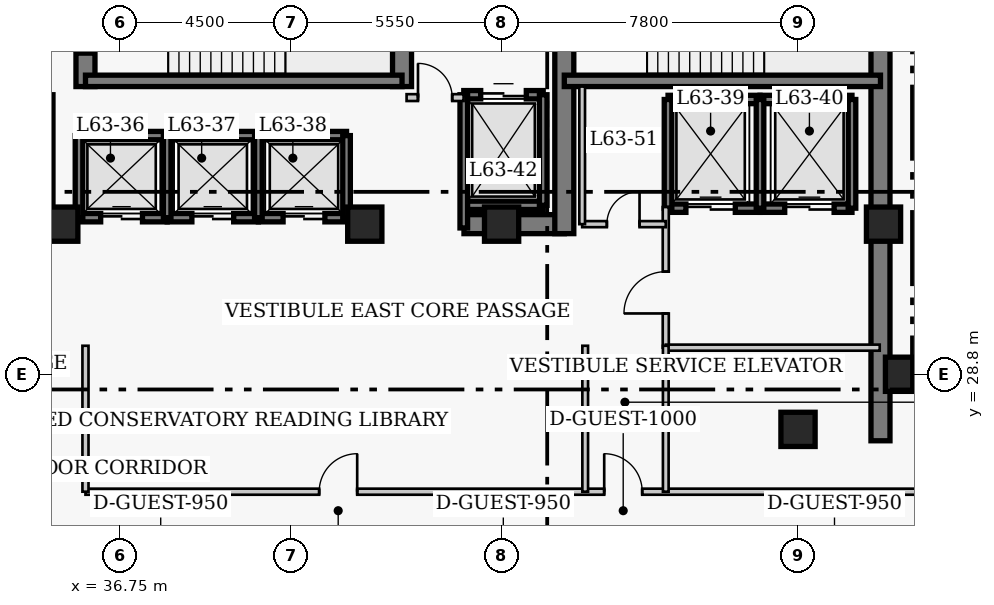
"""IFC4 building model, lengths in metres.
Left out: names, types, materials, properties, quantities, classifications, styles, units other than length and angle.
Written with IfcOpenShell. Run it as: python <this file> out.ifc"""

import sys

from ifc_helpers import new_model, si_unit, direction, frame, frame_2d, origin, origin_2d, place, context, subcontext, project, spatial, rectangle, extrude, element, fill, save


model = new_model("IFC4")
c1 = context("Model", 3, precision=1e-05, world=origin(), true_north=direction((0.0, 1.0)))
c2 = subcontext(c1, "Body", "Model", "MODEL_VIEW")
j1 = project(units=[si_unit("LENGTHUNIT", "METRE"), si_unit("PLANEANGLEUNIT", "RADIAN")], contexts=[c1])
p1 = place(None, origin())
s1 = spatial("IfcSite", under=j1, at=p1, CompositionType="ELEMENT")
p2 = place(p1, origin())
s2 = spatial("IfcBuilding", under=s1, at=p2, CompositionType="ELEMENT")
p3 = place(p2, frame((0.0, 0.0, 253.4)))
s3 = spatial("IfcBuildingStorey", under=s2, at=p3, CompositionType="ELEMENT", Elevation=253.4)
p4 = place(p3, frame((56.77, 27.05, 0.0), z_axis=(0.0, 0.0, 1.0), x_axis=(0.0, 1.0, 0.0)))
e1 = element("IfcWall", 1, at=p4, inside=s3, PredefinedType="SHEAR", context=c2, shape_type="SweptSolid", body=[
    extrude(rectangle(XDim=13.52, YDim=0.5, at=frame_2d((6.76, 0.0))), origin(), (0.0, 0.0, 1.0), 4.0),
])
p5 = place(p3, frame((45.81, 32.75, 0.0), z_axis=(0.0, 0.0, 1.0), x_axis=(1.0, 0.0, 0.0)))
e2 = element("IfcWall", 2, at=p5, inside=s3, PredefinedType="SHEAR", context=c2, shape_type="SweptSolid", body=[
    extrude(rectangle(XDim=2.64, YDim=0.5, at=frame_2d((1.32, 0.0))), origin(), (0.0, 0.0, 1.0), 4.0),
])
p6 = place(p3, frame((35.85, 36.37, 0.0), z_axis=(0.0, 0.0, 1.0), x_axis=(0.0, 1.0, 0.0)))
e3 = element("IfcWall", 3, at=p6, inside=s3, PredefinedType="SHEAR", context=c2, shape_type="SweptSolid", body=[
    extrude(rectangle(XDim=3.95, YDim=0.5, at=frame_2d((1.975, 0.0))), origin(), (0.0, 0.0, 1.0), 4.0),
])
p7 = place(p6, frame((0.88, 0.0, 0.0)))
e4 = element("IfcOpeningElement", 4, at=p7, cuts=e3, PredefinedType="OPENING", context=c2, shape_type="SweptSolid", body=[
    extrude(rectangle(XDim=1.1, YDim=2.15, at=frame_2d((0.55, 1.075))), frame((0.0, 0.26, 0.0), z_axis=(0.0, -1.0, 0.0), x_axis=(1.0, 0.0, 0.0)), (0.0, 0.0, 1.0), 0.52),
])
p8 = place(p3, frame((44.18, 36.37, 0.0), z_axis=(0.0, 0.0, 1.0), x_axis=(0.0, 1.0, 0.0)))
e5 = element("IfcWall", 5, at=p8, inside=s3, PredefinedType="SHEAR", context=c2, shape_type="SweptSolid", body=[
    extrude(rectangle(XDim=3.95, YDim=0.5, at=frame_2d((1.975, 0.0))), origin(), (0.0, 0.0, 1.0), 4.0),
])
p9 = place(p3, frame((48.45, 32.5, 0.0), z_axis=(0.0, 0.0, 1.0), x_axis=(0.0, 1.0, 0.0)))
e6 = element("IfcWall", 6, at=p9, inside=s3, PredefinedType="SHEAR", context=c2, shape_type="SweptSolid", body=[
    extrude(rectangle(XDim=7.82, YDim=0.5, at=frame_2d((3.91, 0.0))), origin(), (0.0, 0.0, 1.0), 4.0),
])
p10 = place(p9, frame((5.7, 0.0, 0.0)))
e7 = element("IfcOpeningElement", 7, at=p10, cuts=e6, PredefinedType="OPENING", context=c2, shape_type="SweptSolid", body=[
    extrude(rectangle(XDim=1.1, YDim=2.15, at=frame_2d((0.55, 1.075))), frame((0.0, 0.26, 0.0), z_axis=(0.0, -1.0, 0.0), x_axis=(1.0, 0.0, 0.0)), (0.0, 0.0, 1.0), 0.52),
])
p11 = place(p3, frame((35.85, 36.52, 0.0), z_axis=(0.0, 0.0, 1.0), x_axis=(1.0, 0.0, 0.0)))
e8 = element("IfcWall", 8, at=p11, inside=s3, PredefinedType="SHEAR", context=c2, shape_type="SweptSolid", body=[
    extrude(rectangle(XDim=8.33, YDim=0.3, at=frame_2d((4.165, 0.0))), origin(), (0.0, 0.0, 1.0), 4.0),
])
p12 = place(p3, frame((48.45, 36.52, 0.0), z_axis=(0.0, 0.0, 1.0), x_axis=(1.0, 0.0, 0.0)))
e9 = element("IfcWall", 9, at=p12, inside=s3, PredefinedType="SHEAR", context=c2, shape_type="SweptSolid", body=[
    extrude(rectangle(XDim=8.32, YDim=0.3, at=frame_2d((4.16, 0.0))), origin(), (0.0, 0.0, 1.0), 4.0),
])
for number, where, z_axis, x_axis in (
    (10, (57.35, 28.8, 0.0), (0.0, 0.0, 1.0), (1.0, 0.0, 0.0)),
    (11, (35.2, 32.75, 0.0), (0.0, 0.0, 1.0), (1.0, 0.0, 0.0)),
    (12, (43.2, 32.75, 0.0), (0.0, 0.0, 1.0), (1.0, 0.0, 0.0)),
    (13, (46.8, 32.75, 0.0), (0.0, 0.0, 1.0), (1.0, 0.0, 0.0)),
    (14, (54.6, 27.35, 0.0), (0.0, 0.0, 1.0), (1.0, 0.0, 0.0)),
    (15, (56.85, 32.75, 0.0), (0.0, 0.0, 1.0), (1.0, 0.0, 0.0)),
):
    element("IfcColumn", number, at=place(p3, frame(where, z_axis=z_axis, x_axis=x_axis)), inside=s3, PredefinedType="COLUMN", context=c2, shape_type="SweptSolid", body=[
        extrude(rectangle(XDim=0.9, YDim=0.9, at=origin_2d()), origin(), (0.0, 0.0, 1.0), 4.0),
    ])
p13 = place(p3, frame((35.68, 35.08, 0.0), z_axis=(0.0, 0.0, 1.0), x_axis=(1.0, 0.0, 0.0)))
e16 = element("IfcWall", 16, at=p13, inside=s3, PredefinedType="SHEAR", context=c2, shape_type="SweptSolid", body=[
    extrude(rectangle(XDim=2.32, YDim=0.22, at=frame_2d((1.16, 0.0))), origin(), (0.0, 0.0, 1.0), 4.0),
])
p14 = place(p3, frame((35.68, 32.92, 0.0), z_axis=(0.0, 0.0, 1.0), x_axis=(1.0, 0.0, 0.0)))
e17 = element("IfcWall", 17, at=p14, inside=s3, PredefinedType="SHEAR", context=c2, shape_type="SweptSolid", body=[
    extrude(rectangle(XDim=2.32, YDim=0.22, at=frame_2d((1.16, 0.0))), origin(), (0.0, 0.0, 1.0), 4.0),
])
p15 = place(p14, frame((0.57, 0.0, 0.0)))
e18 = element("IfcOpeningElement", 18, at=p15, cuts=e17, PredefinedType="OPENING", context=c2, shape_type="SweptSolid", body=[
    extrude(rectangle(XDim=1.1, YDim=2.15, at=frame_2d((0.55, 1.075))), frame((0.0, 0.12, 0.0), z_axis=(0.0, -1.0, 0.0), x_axis=(1.0, 0.0, 0.0)), (0.0, 0.0, 1.0), 0.24),
])
p16 = place(p3, frame((35.68, 32.92, 0.0), z_axis=(0.0, 0.0, 1.0), x_axis=(0.0, 1.0, 0.0)))
e19 = element("IfcWall", 19, at=p16, inside=s3, PredefinedType="SHEAR", context=c2, shape_type="SweptSolid", body=[
    extrude(rectangle(XDim=2.16, YDim=0.2, at=frame_2d((1.08, 0.0))), origin(), (0.0, 0.0, 1.0), 4.0),
])
p17 = place(p3, frame((38.0, 35.08, 0.0), z_axis=(0.0, 0.0, 1.0), x_axis=(1.0, 0.0, 0.0)))
e20 = element("IfcWall", 20, at=p17, inside=s3, PredefinedType="SHEAR", context=c2, shape_type="SweptSolid", body=[
    extrude(rectangle(XDim=2.4, YDim=0.22, at=frame_2d((1.2, 0.0))), origin(), (0.0, 0.0, 1.0), 4.0),
])
p18 = place(p3, frame((38.0, 32.92, 0.0), z_axis=(0.0, 0.0, 1.0), x_axis=(1.0, 0.0, 0.0)))
e21 = element("IfcWall", 21, at=p18, inside=s3, PredefinedType="SHEAR", context=c2, shape_type="SweptSolid", body=[
    extrude(rectangle(XDim=2.4, YDim=0.22, at=frame_2d((1.2, 0.0))), origin(), (0.0, 0.0, 1.0), 4.0),
])
p19 = place(p18, frame((0.65, 0.0, 0.0)))
e22 = element("IfcOpeningElement", 22, at=p19, cuts=e21, PredefinedType="OPENING", context=c2, shape_type="SweptSolid", body=[
    extrude(rectangle(XDim=1.1, YDim=2.15, at=frame_2d((0.55, 1.075))), frame((0.0, 0.12, 0.0), z_axis=(0.0, -1.0, 0.0), x_axis=(1.0, 0.0, 0.0)), (0.0, 0.0, 1.0), 0.24),
])
p20 = place(p3, frame((38.0, 32.92, 0.0), z_axis=(0.0, 0.0, 1.0), x_axis=(0.0, 1.0, 0.0)))
e23 = element("IfcWall", 23, at=p20, inside=s3, PredefinedType="SHEAR", context=c2, shape_type="SweptSolid", body=[
    extrude(rectangle(XDim=2.16, YDim=0.2, at=frame_2d((1.08, 0.0))), origin(), (0.0, 0.0, 1.0), 4.0),
])
p21 = place(p3, frame((40.4, 35.08, 0.0), z_axis=(0.0, 0.0, 1.0), x_axis=(1.0, 0.0, 0.0)))
e24 = element("IfcWall", 24, at=p21, inside=s3, PredefinedType="SHEAR", context=c2, shape_type="SweptSolid", body=[
    extrude(rectangle(XDim=2.32, YDim=0.22, at=frame_2d((1.16, 0.0))), origin(), (0.0, 0.0, 1.0), 4.0),
])
p22 = place(p3, frame((40.4, 32.92, 0.0), z_axis=(0.0, 0.0, 1.0), x_axis=(1.0, 0.0, 0.0)))
e25 = element("IfcWall", 25, at=p22, inside=s3, PredefinedType="SHEAR", context=c2, shape_type="SweptSolid", body=[
    extrude(rectangle(XDim=2.32, YDim=0.22, at=frame_2d((1.16, 0.0))), origin(), (0.0, 0.0, 1.0), 4.0),
])
p23 = place(p22, frame((0.65, 0.0, 0.0)))
e26 = element("IfcOpeningElement", 26, at=p23, cuts=e25, PredefinedType="OPENING", context=c2, shape_type="SweptSolid", body=[
    extrude(rectangle(XDim=1.1, YDim=2.15, at=frame_2d((0.55, 1.075))), frame((0.0, 0.12, 0.0), z_axis=(0.0, -1.0, 0.0), x_axis=(1.0, 0.0, 0.0)), (0.0, 0.0, 1.0), 0.24),
])
for number, where, z_axis, x_axis in (
    (27, (40.4, 32.92, 0.0), (0.0, 0.0, 1.0), (0.0, 1.0, 0.0)),
    (28, (42.72, 32.92, 0.0), (0.0, 0.0, 1.0), (0.0, 1.0, 0.0)),
):
    element("IfcWall", number, at=place(p3, frame(where, z_axis=z_axis, x_axis=x_axis)), inside=s3, PredefinedType="SHEAR", context=c2, shape_type="SweptSolid", body=[
        extrude(rectangle(XDim=2.16, YDim=0.2, at=frame_2d((1.08, 0.0))), origin(), (0.0, 0.0, 1.0), 4.0),
    ])
p24 = place(p3, frame((51.18, 36.03, 0.0), z_axis=(0.0, 0.0, 1.0), x_axis=(1.0, 0.0, 0.0)))
e29 = element("IfcWall", 29, at=p24, inside=s3, PredefinedType="SHEAR", context=c2, shape_type="SweptSolid", body=[
    extrude(rectangle(XDim=2.42, YDim=0.22, at=frame_2d((1.21, 0.0))), origin(), (0.0, 0.0, 1.0), 4.0),
])
p25 = place(p3, frame((51.18, 33.17, 0.0), z_axis=(0.0, 0.0, 1.0), x_axis=(1.0, 0.0, 0.0)))
e30 = element("IfcWall", 30, at=p25, inside=s3, PredefinedType="SHEAR", context=c2, shape_type="SweptSolid", body=[
    extrude(rectangle(XDim=2.42, YDim=0.22, at=frame_2d((1.21, 0.0))), origin(), (0.0, 0.0, 1.0), 4.0),
])
p26 = place(p25, frame((0.47, 0.0, 0.0)))
e31 = element("IfcOpeningElement", 31, at=p26, cuts=e30, PredefinedType="OPENING", context=c2, shape_type="SweptSolid", body=[
    extrude(rectangle(XDim=1.3, YDim=2.15, at=frame_2d((0.65, 1.075))), frame((0.0, 0.12, 0.0), z_axis=(0.0, -1.0, 0.0), x_axis=(1.0, 0.0, 0.0)), (0.0, 0.0, 1.0), 0.24),
])
p27 = place(p3, frame((51.18, 33.17, 0.0), z_axis=(0.0, 0.0, 1.0), x_axis=(0.0, 1.0, 0.0)))
e32 = element("IfcWall", 32, at=p27, inside=s3, PredefinedType="SHEAR", context=c2, shape_type="SweptSolid", body=[
    extrude(rectangle(XDim=2.86, YDim=0.2, at=frame_2d((1.43, 0.0))), origin(), (0.0, 0.0, 1.0), 4.0),
])
p28 = place(p3, frame((53.6, 36.03, 0.0), z_axis=(0.0, 0.0, 1.0), x_axis=(1.0, 0.0, 0.0)))
e33 = element("IfcWall", 33, at=p28, inside=s3, PredefinedType="SHEAR", context=c2, shape_type="SweptSolid", body=[
    extrude(rectangle(XDim=2.42, YDim=0.22, at=frame_2d((1.21, 0.0))), origin(), (0.0, 0.0, 1.0), 4.0),
])
p29 = place(p3, frame((53.6, 33.17, 0.0), z_axis=(0.0, 0.0, 1.0), x_axis=(1.0, 0.0, 0.0)))
e34 = element("IfcWall", 34, at=p29, inside=s3, PredefinedType="SHEAR", context=c2, shape_type="SweptSolid", body=[
    extrude(rectangle(XDim=2.42, YDim=0.22, at=frame_2d((1.21, 0.0))), origin(), (0.0, 0.0, 1.0), 4.0),
])
p30 = place(p29, frame((0.65, 0.0, 0.0)))
e35 = element("IfcOpeningElement", 35, at=p30, cuts=e34, PredefinedType="OPENING", context=c2, shape_type="SweptSolid", body=[
    extrude(rectangle(XDim=1.3, YDim=2.15, at=frame_2d((0.65, 1.075))), frame((0.0, 0.12, 0.0), z_axis=(0.0, -1.0, 0.0), x_axis=(1.0, 0.0, 0.0)), (0.0, 0.0, 1.0), 0.24),
])
for number, where, z_axis, x_axis in (
    (36, (53.6, 33.17, 0.0), (0.0, 0.0, 1.0), (0.0, 1.0, 0.0)),
    (37, (56.02, 33.17, 0.0), (0.0, 0.0, 1.0), (0.0, 1.0, 0.0)),
):
    element("IfcWall", number, at=place(p3, frame(where, z_axis=z_axis, x_axis=x_axis)), inside=s3, PredefinedType="SHEAR", context=c2, shape_type="SweptSolid", body=[
        extrude(rectangle(XDim=2.86, YDim=0.2, at=frame_2d((1.43, 0.0))), origin(), (0.0, 0.0, 1.0), 4.0),
    ])
p31 = place(p3, frame((34.895, 33.245, 0.0), z_axis=(0.0, 0.0, 1.0), x_axis=(0.0, 1.0, 0.0)))
e38 = element("IfcWall", 38, at=p31, inside=s3, PredefinedType="SHEAR", context=c2, shape_type="SweptSolid", body=[
    extrude(rectangle(XDim=2.91, YDim=0.2, at=frame_2d((1.455, 0.0))), origin(), (0.0, 0.0, 1.0), 4.0),
])
p32 = place(p3, frame((45.805, 36.155, 0.0), z_axis=(0.0, 0.0, 1.0), x_axis=(1.0, 0.0, 0.0)))
e39 = element("IfcWall", 39, at=p32, inside=s3, PredefinedType="SHEAR", context=c2, shape_type="SweptSolid", body=[
    extrude(rectangle(XDim=2.09, YDim=0.22, at=frame_2d((1.045, 0.0))), origin(), (0.0, 0.0, 1.0), 4.0),
])
p33 = place(p32, frame((0.445, 0.0, 0.0)))
e40 = element("IfcOpeningElement", 40, at=p33, cuts=e39, PredefinedType="OPENING", context=c2, shape_type="SweptSolid", body=[
    extrude(rectangle(XDim=1.2, YDim=2.15, at=frame_2d((0.6, 1.075))), frame((0.0, 0.12, 0.0), z_axis=(0.0, -1.0, 0.0), x_axis=(1.0, 0.0, 0.0)), (0.0, 0.0, 1.0), 0.24),
])
p34 = place(p3, frame((45.805, 33.245, 0.0), z_axis=(0.0, 0.0, 1.0), x_axis=(1.0, 0.0, 0.0)))
e41 = element("IfcWall", 41, at=p34, inside=s3, PredefinedType="SHEAR", context=c2, shape_type="SweptSolid", body=[
    extrude(rectangle(XDim=2.09, YDim=0.22, at=frame_2d((1.045, 0.0))), origin(), (0.0, 0.0, 1.0), 4.0),
])
p35 = place(p3, frame((45.805, 32.65, 0.0), z_axis=(0.0, 0.0, 1.0), x_axis=(0.0, 1.0, 0.0)))
e42 = element("IfcWall", 42, at=p35, inside=s3, PredefinedType="SHEAR", context=c2, shape_type="SweptSolid", body=[
    extrude(rectangle(XDim=3.505, YDim=0.2, at=frame_2d((1.752, 0.0))), origin(), (0.0, 0.0, 1.0), 4.0),
])
p36 = place(p3, frame((47.895, 33.245, 0.0), z_axis=(0.0, 0.0, 1.0), x_axis=(0.0, 1.0, 0.0)))
e43 = element("IfcWall", 43, at=p36, inside=s3, PredefinedType="SHEAR", context=c2, shape_type="SweptSolid", body=[
    extrude(rectangle(XDim=2.91, YDim=0.2, at=frame_2d((1.455, 0.0))), origin(), (0.0, 0.0, 1.0), 4.0),
])
p37 = place(p3, frame((44.3, 36.08, 0.0), z_axis=(0.0, 0.0, 1.0), x_axis=(1.0, 0.0, 0.0)))
e44 = element("IfcWall", 44, at=p37, inside=s3, PredefinedType="PARTITIONING", context=c2, shape_type="SweptSolid", body=[
    extrude(rectangle(XDim=1.5, YDim=0.18, at=frame_2d((0.75, 0.0))), origin(), (0.0, 0.0, 1.0), 3.76),
])
p38 = place(p37, frame((0.3, 0.0, 0.0)))
e45 = element("IfcOpeningElement", 45, at=p38, cuts=e44, PredefinedType="OPENING", context=c2, shape_type="SweptSolid", body=[
    extrude(rectangle(XDim=0.9, YDim=2.15, at=frame_2d((0.45, 1.075))), frame((0.0, 0.1, 0.0), z_axis=(0.0, -1.0, 0.0), x_axis=(1.0, 0.0, 0.0)), (0.0, 0.0, 1.0), 0.2),
])
p39 = place(p3, frame((51.12, 29.5, 0.0), z_axis=(0.0, 0.0, 1.0), x_axis=(0.0, 1.0, 0.0)))
e46 = element("IfcWall", 46, at=p39, inside=s3, PredefinedType="PARTITIONING", context=c2, shape_type="SweptSolid", body=[
    extrude(rectangle(XDim=3.7, YDim=0.16, at=frame_2d((1.85, 0.0))), origin(), (0.0, 0.0, 1.0), 3.76),
])
p40 = place(p39, frame((0.9, 0.0, 0.0)))
e47 = element("IfcOpeningElement", 47, at=p40, cuts=e46, PredefinedType="OPENING", context=c2, shape_type="SweptSolid", body=[
    extrude(rectangle(XDim=1.1, YDim=2.15, at=frame_2d((0.55, 1.075))), frame((0.0, 0.09, 0.0), z_axis=(0.0, -1.0, 0.0), x_axis=(1.0, 0.0, 0.0)), (0.0, 0.0, 1.0), 0.18),
])
p41 = place(p3, frame((51.12, 29.5, 0.0), z_axis=(0.0, 0.0, 1.0), x_axis=(1.0, 0.0, 0.0)))
e48 = element("IfcWall", 48, at=p41, inside=s3, PredefinedType="PARTITIONING", context=c2, shape_type="SweptSolid", body=[
    extrude(rectangle(XDim=5.63, YDim=0.16, at=frame_2d((2.815, 0.0))), origin(), (0.0, 0.0, 1.0), 3.76),
])
p42 = place(p3, frame((48.92, 32.75, 0.0), z_axis=(0.0, 0.0, 1.0), x_axis=(1.0, 0.0, 0.0)))
e49 = element("IfcWall", 49, at=p42, inside=s3, PredefinedType="PARTITIONING", context=c2, shape_type="SweptSolid", body=[
    extrude(rectangle(XDim=2.2, YDim=0.16, at=frame_2d((1.1, 0.0))), origin(), (0.0, 0.0, 1.0), 3.76),
])
p43 = place(p42, frame((0.65, 0.0, 0.0)))
e50 = element("IfcOpeningElement", 50, at=p43, cuts=e49, PredefinedType="OPENING", context=c2, shape_type="SweptSolid", body=[
    extrude(rectangle(XDim=0.86, YDim=2.05, at=frame_2d((0.43, 1.025))), frame((0.0, 0.09, 0.0), z_axis=(0.0, -1.0, 0.0), x_axis=(1.0, 0.0, 0.0)), (0.0, 0.0, 1.0), 0.18),
])
p44 = place(p3, frame((48.92, 32.75, 0.0), z_axis=(0.0, 0.0, 1.0), x_axis=(0.0, 1.0, 0.0)))
e51 = element("IfcWall", 51, at=p44, inside=s3, PredefinedType="PARTITIONING", context=c2, shape_type="SweptSolid", body=[
    extrude(rectangle(XDim=3.62, YDim=0.15, at=frame_2d((1.81, 0.0))), origin(), (0.0, 0.0, 1.0), 3.76),
])
p45 = place(p3, frame((35.85, 25.71, 0.0), z_axis=(0.0, 0.0, 1.0), x_axis=(1.0, 0.0, 0.0)))
e52 = element("IfcWall", 52, at=p45, inside=s3, PredefinedType="PARTITIONING", context=c2, shape_type="SweptSolid", body=[
    extrude(rectangle(XDim=23.45, YDim=0.16, at=frame_2d((11.725, 0.0))), origin(), (0.0, 0.0, 1.0), 3.76),
])
p46 = place(p45, frame((6.15, 0.0, 0.0)))
e53 = element("IfcOpeningElement", 53, at=p46, cuts=e52, PredefinedType="OPENING", context=c2, shape_type="SweptSolid", body=[
    extrude(rectangle(XDim=1.0, YDim=2.15, at=frame_2d((0.5, 1.075))), frame((0.0, 0.09, 0.0), z_axis=(0.0, -1.0, 0.0), x_axis=(1.0, 0.0, 0.0)), (0.0, 0.0, 1.0), 0.18),
])
p47 = place(p45, frame((13.65, 0.0, 0.0)))
e54 = element("IfcOpeningElement", 54, at=p47, cuts=e52, PredefinedType="OPENING", context=c2, shape_type="SweptSolid", body=[
    extrude(rectangle(XDim=1.0, YDim=2.15, at=frame_2d((0.5, 1.075))), frame((0.0, 0.09, 0.0), z_axis=(0.0, -1.0, 0.0), x_axis=(1.0, 0.0, 0.0)), (0.0, 0.0, 1.0), 0.18),
])
p48 = place(p3, frame((35.85, 25.71, 0.0), z_axis=(0.0, 0.0, 1.0), x_axis=(0.0, 1.0, 0.0)))
e55 = element("IfcWall", 55, at=p48, inside=s3, PredefinedType="PARTITIONING", context=c2, shape_type="SweptSolid", body=[
    extrude(rectangle(XDim=3.84, YDim=0.16, at=frame_2d((1.92, 0.0))), origin(), (0.0, 0.0, 1.0), 3.76),
])
for number, where, z_axis, x_axis in (
    (56, (49.0, 25.71, 0.0), (0.0, 0.0, 1.0), (0.0, 1.0, 0.0)),
    (57, (51.12, 25.71, 0.0), (0.0, 0.0, 1.0), (0.0, 1.0, 0.0)),
):
    element("IfcWall", number, at=place(p3, frame(where, z_axis=z_axis, x_axis=x_axis)), inside=s3, PredefinedType="PARTITIONING", context=c2, shape_type="SweptSolid", body=[
        extrude(rectangle(XDim=3.84, YDim=0.15, at=frame_2d((1.92, 0.0))), origin(), (0.0, 0.0, 1.0), 3.76),
    ])
p49 = place(p15, origin())
e58 = element("IfcDoor", 58, at=p49, inside=s3, OperationType="DOUBLE_DOOR_SLIDING", PredefinedType="DOOR", context=c2, shape_type="SweptSolid", body=[
    extrude(rectangle(XDim=1.1, YDim=2.15, at=frame_2d((0.55, 1.075))), frame((0.0, 0.025, 0.0), z_axis=(0.0, -1.0, 0.0), x_axis=(1.0, 0.0, 0.0)), (0.0, 0.0, 1.0), 0.05),
])
fill(e18, e58)
p50 = place(p19, origin())
e59 = element("IfcDoor", 59, at=p50, inside=s3, OperationType="DOUBLE_DOOR_SLIDING", PredefinedType="DOOR", context=c2, shape_type="SweptSolid", body=[
    extrude(rectangle(XDim=1.1, YDim=2.15, at=frame_2d((0.55, 1.075))), frame((0.0, 0.025, 0.0), z_axis=(0.0, -1.0, 0.0), x_axis=(1.0, 0.0, 0.0)), (0.0, 0.0, 1.0), 0.05),
])
fill(e22, e59)
p51 = place(p23, origin())
e60 = element("IfcDoor", 60, at=p51, inside=s3, OperationType="DOUBLE_DOOR_SLIDING", PredefinedType="DOOR", context=c2, shape_type="SweptSolid", body=[
    extrude(rectangle(XDim=1.1, YDim=2.15, at=frame_2d((0.55, 1.075))), frame((0.0, 0.025, 0.0), z_axis=(0.0, -1.0, 0.0), x_axis=(1.0, 0.0, 0.0)), (0.0, 0.0, 1.0), 0.05),
])
fill(e26, e60)
p52 = place(p26, origin())
e61 = element("IfcDoor", 61, at=p52, inside=s3, OperationType="DOUBLE_DOOR_SLIDING", PredefinedType="DOOR", context=c2, shape_type="SweptSolid", body=[
    extrude(rectangle(XDim=1.3, YDim=2.15, at=frame_2d((0.65, 1.075))), frame((0.0, 0.025, 0.0), z_axis=(0.0, -1.0, 0.0), x_axis=(1.0, 0.0, 0.0)), (0.0, 0.0, 1.0), 0.05),
])
fill(e31, e61)
p53 = place(p30, origin())
e62 = element("IfcDoor", 62, at=p53, inside=s3, OperationType="DOUBLE_DOOR_SLIDING", PredefinedType="DOOR", context=c2, shape_type="SweptSolid", body=[
    extrude(rectangle(XDim=1.3, YDim=2.15, at=frame_2d((0.65, 1.075))), frame((0.0, 0.025, 0.0), z_axis=(0.0, -1.0, 0.0), x_axis=(1.0, 0.0, 0.0)), (0.0, 0.0, 1.0), 0.05),
])
fill(e35, e62)
p54 = place(p33, origin())
e63 = element("IfcDoor", 63, at=p54, inside=s3, OperationType="DOUBLE_DOOR_SLIDING", PredefinedType="DOOR", context=c2, shape_type="SweptSolid", body=[
    extrude(rectangle(XDim=1.2, YDim=2.15, at=frame_2d((0.6, 1.075))), frame((0.0, 0.025, 0.0), z_axis=(0.0, -1.0, 0.0), x_axis=(1.0, 0.0, 0.0)), (0.0, 0.0, 1.0), 0.05),
])
fill(e40, e63)
p55 = place(p38, origin())
e64 = element("IfcDoor", 64, at=p55, inside=s3, OperationType="SINGLE_SWING_LEFT", PredefinedType="DOOR", context=c2, shape_type="SweptSolid", body=[
    extrude(rectangle(XDim=0.9, YDim=2.15, at=frame_2d((0.45, 1.075))), frame((0.0, 0.025, 0.0), z_axis=(0.0, -1.0, 0.0), x_axis=(1.0, 0.0, 0.0)), (0.0, 0.0, 1.0), 0.05),
])
fill(e45, e64)
p56 = place(p40, origin())
e65 = element("IfcDoor", 65, at=p56, inside=s3, OperationType="SINGLE_SWING_LEFT", PredefinedType="DOOR", context=c2, shape_type="SweptSolid", body=[
    extrude(rectangle(XDim=1.1, YDim=2.15, at=frame_2d((0.55, 1.075))), frame((0.0, 0.025, 0.0), z_axis=(0.0, -1.0, 0.0), x_axis=(1.0, 0.0, 0.0)), (0.0, 0.0, 1.0), 0.05),
])
fill(e47, e65)
p57 = place(p43, origin())
e66 = element("IfcDoor", 66, at=p57, inside=s3, OperationType="SINGLE_SWING_RIGHT", PredefinedType="DOOR", context=c2, shape_type="SweptSolid", body=[
    extrude(rectangle(XDim=0.86, YDim=2.05, at=frame_2d((0.43, 1.025))), frame((0.0, 0.025, 0.0), z_axis=(0.0, -1.0, 0.0), x_axis=(1.0, 0.0, 0.0)), (0.0, 0.0, 1.0), 0.05),
])
fill(e50, e66)
p58 = place(p46, origin())
e67 = element("IfcDoor", 67, at=p58, inside=s3, OperationType="SINGLE_SWING_RIGHT", PredefinedType="DOOR", context=c2, shape_type="SweptSolid", body=[
    extrude(rectangle(XDim=1.0, YDim=2.15, at=frame_2d((0.5, 1.075))), frame((0.0, 0.025, 0.0), z_axis=(0.0, -1.0, 0.0), x_axis=(1.0, 0.0, 0.0)), (0.0, 0.0, 1.0), 0.05),
])
fill(e53, e67)
p59 = place(p47, origin())
e68 = element("IfcDoor", 68, at=p59, inside=s3, OperationType="SINGLE_SWING_LEFT", PredefinedType="DOOR", context=c2, shape_type="SweptSolid", body=[
    extrude(rectangle(XDim=1.0, YDim=2.15, at=frame_2d((0.5, 1.075))), frame((0.0, 0.025, 0.0), z_axis=(0.0, -1.0, 0.0), x_axis=(1.0, 0.0, 0.0)), (0.0, 0.0, 1.0), 0.05),
])
fill(e54, e68)
p60 = place(p7, origin())
e69 = element("IfcDoor", 69, at=p60, inside=s3, OperationType="SINGLE_SWING_RIGHT", PredefinedType="DOOR", context=c2, shape_type="SweptSolid", body=[
    extrude(rectangle(XDim=1.1, YDim=2.15, at=frame_2d((0.55, 1.075))), frame((0.0, 0.025, 0.0), z_axis=(0.0, -1.0, 0.0), x_axis=(1.0, 0.0, 0.0)), (0.0, 0.0, 1.0), 0.05),
])
fill(e4, e69)
save(model, sys.argv[1])
